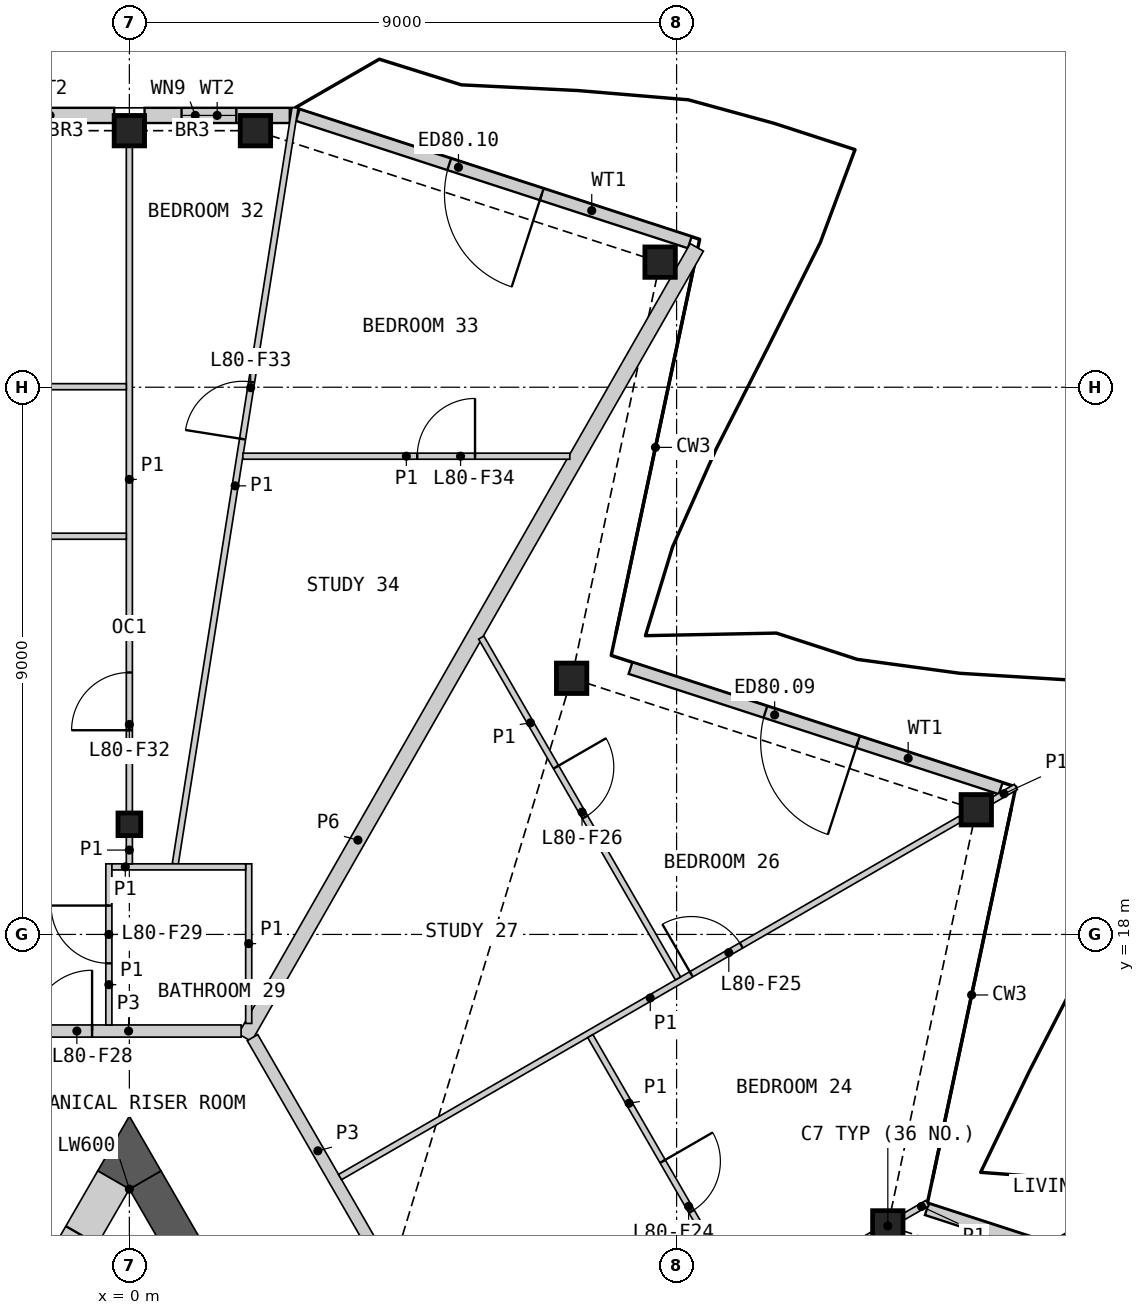
"""IFC4 building model, lengths in metres.
Left out: names, types, materials, properties, quantities, classifications, styles, units other than length and angle.
Written with IfcOpenShell. Run it as: python <this file> out.ifc"""

import sys

from ifc_helpers import new_model, si_unit, direction, frame, frame_2d, origin, origin_2d, place, context, subcontext, project, spatial, polyline, rectangle, hollow_rectangle, i_section, outline, extrude, element, fill, save


model = new_model("IFC4")
c1 = context("Model", 3, precision=1e-05, world=origin(), true_north=direction((0.0, 1.0)))
c2 = subcontext(c1, "Body", "Model", "MODEL_VIEW")
j1 = project(units=[si_unit("LENGTHUNIT", "METRE"), si_unit("PLANEANGLEUNIT", "RADIAN")], contexts=[c1])
p1 = place(None, origin())
s1 = spatial("IfcSite", under=j1, at=p1, CompositionType="ELEMENT")
p2 = place(p1, origin())
s2 = spatial("IfcBuilding", under=s1, at=p2, CompositionType="ELEMENT")
p3 = place(p2, frame((0.0, 0.0, 361.0)))
s3 = spatial("IfcBuildingStorey", under=s2, at=p3, CompositionType="ELEMENT", Elevation=361.0)
for number, where, z_axis, x_axis in (
    (1, (12.474, 13.206, 0.0), (0.0, 0.0, 1.0), (1.0, 0.0, 0.0)),
    (2, (13.929, 20.051, 0.0), (0.0, 0.0, 1.0), (1.0, 0.0, 0.0)),
    (3, (7.274, 22.213, 0.0), (0.0, 0.0, 1.0), (1.0, 0.0, 0.0)),
    (4, (8.729, 29.057, 0.0), (0.0, 0.0, 1.0), (1.0, 0.0, 0.0)),
    (5, (2.074, 31.219, 0.0), (0.0, 0.0, 1.0), (1.0, 0.0, 0.0)),
    (6, (0.0, 31.219, 0.0), (0.0, 0.0, 1.0), (1.0, 0.0, 0.0)),
):
    element("IfcColumn", number, at=place(p3, frame(where, z_axis=z_axis, x_axis=x_axis)), inside=s3, PredefinedType="COLUMN", context=c2, shape_type="SweptSolid", body=[
        extrude(hollow_rectangle(XDim=0.5, YDim=0.5, WallThickness=0.03, at=origin_2d()), origin(), (0.0, 0.0, 1.0), 3.4),
    ])
p4 = place(p3, frame((0.0, 19.811, 0.0), z_axis=(0.0, 0.0, 1.0), x_axis=(1.0, 0.0, 0.0)))
e7 = element("IfcColumn", 7, at=p4, inside=s3, PredefinedType="COLUMN", context=c2, shape_type="SweptSolid", body=[
    extrude(i_section(OverallWidth=0.374, OverallDepth=0.372, WebThickness=0.016, FlangeThickness=0.026, at=origin_2d()), origin(), (0.0, 0.0, 1.0), 3.4),
])
p5 = place(p3, frame((19.467, 11.416, 0.0), z_axis=(0.0, 0.0, 1.0), x_axis=(-0.951057706878, 0.309013330114, 0.0)))
e8 = element("IfcWall", 8, at=p5, inside=s3, PredefinedType="SOLIDWALL", context=c2, shape_type="SweptSolid", body=[
    extrude(rectangle(XDim=6.678, YDim=0.2, at=frame_2d((3.339, 0.0))), origin(), (0.0, 0.0, 1.0), 2.634),
])
p6 = place(p5, frame((2.402, 0.0, 0.0)))
e9 = element("IfcOpeningElement", 9, at=p6, cuts=e8, PredefinedType="OPENING", context=c2, shape_type="SweptSolid", body=[
    extrude(rectangle(XDim=1.6, YDim=2.25, at=frame_2d((0.8, 1.125))), frame((0.0, 0.11, 0.0), z_axis=(0.0, -1.0, 0.0), x_axis=(1.0, 0.0, 0.0)), (0.0, 0.0, 1.0), 0.22),
])
p7 = place(p3, frame((14.331, 20.402, 0.0), z_axis=(0.0, 0.0, 1.0), x_axis=(-0.951058447414, 0.30901105094, 0.0)))
e10 = element("IfcWall", 10, at=p7, inside=s3, PredefinedType="SOLIDWALL", context=c2, shape_type="SweptSolid", body=[
    extrude(rectangle(XDim=6.402, YDim=0.2, at=frame_2d((3.201, 0.0))), origin(), (0.0, 0.0, 1.0), 2.634),
])
p8 = place(p7, frame((2.469, 0.0, 0.0)))
e11 = element("IfcOpeningElement", 11, at=p8, cuts=e10, PredefinedType="OPENING", context=c2, shape_type="SweptSolid", body=[
    extrude(rectangle(XDim=1.6, YDim=2.25, at=frame_2d((0.8, 1.125))), frame((0.0, 0.11, 0.0), z_axis=(0.0, -1.0, 0.0), x_axis=(1.0, 0.0, 0.0)), (0.0, 0.0, 1.0), 0.22),
])
p9 = place(p3, frame((9.216, 29.381, 0.0), z_axis=(0.0, 0.0, 1.0), x_axis=(-0.951058150748, 0.309011964002, 0.0)))
e12 = element("IfcWall", 12, at=p9, inside=s3, PredefinedType="SOLIDWALL", context=c2, shape_type="SweptSolid", body=[
    extrude(rectangle(XDim=6.779, YDim=0.2, at=frame_2d((3.389, 0.0))), origin(), (0.0, 0.0, 1.0), 2.634),
])
p10 = place(p9, frame((2.559, 0.0, 0.0)))
e13 = element("IfcOpeningElement", 13, at=p10, cuts=e12, PredefinedType="OPENING", context=c2, shape_type="SweptSolid", body=[
    extrude(rectangle(XDim=1.6, YDim=2.25, at=frame_2d((0.8, 1.125))), frame((0.0, 0.11, 0.0), z_axis=(0.0, -1.0, 0.0), x_axis=(1.0, 0.0, 0.0)), (0.0, 0.0, 1.0), 0.22),
])
p11 = place(p3, frame((2.638, 31.47, 0.0), z_axis=(0.0, 0.0, 1.0), x_axis=(-1.0, 0.0, 0.0)))
e14 = element("IfcWall", 14, at=p11, inside=s3, PredefinedType="SOLIDWALL", context=c2, shape_type="SweptSolid", body=[
    extrude(rectangle(XDim=2.388, YDim=0.25, at=frame_2d((1.194, 0.0))), origin(), (0.0, 0.0, 1.0), 2.634),
])
p12 = place(p11, frame((0.88, 0.0, 0.6)))
e15 = element("IfcOpeningElement", 15, at=p12, cuts=e14, PredefinedType="OPENING", context=c2, shape_type="SweptSolid", body=[
    extrude(rectangle(XDim=0.9, YDim=1.8, at=frame_2d((0.45, 0.9))), frame((0.0, 0.135, 0.0), z_axis=(0.0, -1.0, 0.0), x_axis=(1.0, 0.0, 0.0)), (0.0, 0.0, 1.0), 0.27),
])
p13 = place(p3, frame((-0.25, 31.47, 0.0), z_axis=(0.0, 0.0, 1.0), x_axis=(-1.0, 0.0, 0.0)))
e16 = element("IfcWall", 16, at=p13, inside=s3, PredefinedType="SOLIDWALL", context=c2, shape_type="SweptSolid", body=[
    extrude(rectangle(XDim=2.109, YDim=0.25, at=frame_2d((1.054, 0.0))), origin(), (0.0, 0.0, 1.0), 2.634),
])
p14 = place(p3, frame((2.361, 10.322, 0.0), z_axis=(0.0, 0.0, 1.0), x_axis=(-0.500000735859, 0.866024978935, 0.0)))
e17 = element("IfcWall", 17, at=p14, inside=s3, PredefinedType="SHEAR", context=c2, shape_type="SweptSolid", body=[
    extrude(rectangle(XDim=4.202, YDim=0.6, at=frame_2d((2.101, 0.0))), origin(), (0.0, 0.0, 1.0), 3.1),
])
p15 = place(p3, origin())
e18 = element("IfcWall", 18, at=p15, inside=s3, PredefinedType="SHEAR", context=c2, shape_type="SweptSolid", body=[
    extrude(outline(polyline([(0.0, 13.811), (-0.52, 14.111), (0.0, 15.011), (0.52, 14.111), (0.0, 13.811)])), origin(), (0.0, 0.0, 1.0), 3.1),
])
p16 = place(p3, frame((-0.26, 13.961, 0.0), z_axis=(0.0, 0.0, 1.0), x_axis=(-0.49997936161, -0.866037319036, 0.0)))
e19 = element("IfcWall", 19, at=p16, inside=s3, PredefinedType="SHEAR", context=c2, shape_type="SweptSolid", body=[
    extrude(rectangle(XDim=2.66, YDim=0.6, at=frame_2d((1.33, 0.0))), origin(), (0.0, 0.0, 1.0), 3.1),
])
p17 = place(p16, frame((1.05, 0.0, 0.0)))
e20 = element("IfcOpeningElement", 20, at=p17, cuts=e19, PredefinedType="OPENING", context=c2, shape_type="SweptSolid", body=[
    extrude(rectangle(XDim=1.0, YDim=2.1, at=frame_2d((0.5, 1.05))), frame((0.0, 0.31, 0.0), z_axis=(0.0, -1.0, 0.0), x_axis=(1.0, 0.0, 0.0)), (0.0, 0.0, 1.0), 0.62),
])
p18 = place(p3, frame((1.901, 16.302, 0.0), z_axis=(0.0, 0.0, 1.0), x_axis=(0.496368960053, 0.86811166073, 0.0)))
e21 = element("IfcWall", 21, at=p18, inside=s3, PredefinedType="PARTITIONING", context=c2, shape_type="SweptSolid", body=[
    extrude(rectangle(XDim=14.972, YDim=0.25, at=frame_2d((7.486, 0.0))), origin(), (0.0, 0.0, 1.0), 2.33),
])
p19 = place(p3, frame((2.025, 16.303, 0.0), z_axis=(0.0, 0.0, 1.0), x_axis=(0.500004215162, -0.866022970146, 0.0)))
e22 = element("IfcWall", 22, at=p19, inside=s3, PredefinedType="PARTITIONING", context=c2, shape_type="SweptSolid", body=[
    extrude(rectangle(XDim=4.3, YDim=0.2, at=frame_2d((2.15, 0.0))), origin(), (0.0, 0.0, 1.0), 3.1),
])
p20 = place(p3, frame((-1.863, 16.411, 0.0), z_axis=(0.0, 0.0, 1.0), x_axis=(1.0, 0.0, 0.0)))
e23 = element("IfcWall", 23, at=p20, inside=s3, PredefinedType="PARTITIONING", context=c2, shape_type="SweptSolid", body=[
    extrude(rectangle(XDim=3.701, YDim=0.2, at=frame_2d((1.851, 0.0))), origin(), (0.0, 0.0, 1.0), 3.1),
])
p21 = place(p20, frame((0.25, 0.0, 0.0)))
e24 = element("IfcOpeningElement", 24, at=p21, cuts=e23, PredefinedType="OPENING", context=c2, shape_type="SweptSolid", body=[
    extrude(rectangle(XDim=1.0, YDim=2.1, at=frame_2d((0.5, 1.05))), frame((0.0, 0.11, 0.0), z_axis=(0.0, -1.0, 0.0), x_axis=(1.0, 0.0, 0.0)), (0.0, 0.0, 1.0), 0.22),
])
p22 = place(p3, frame((0.755, 19.16, 0.0), z_axis=(0.0, 0.0, 1.0), x_axis=(0.15643456532, 0.987688324712, 0.0)))
e25 = element("IfcWall", 25, at=p22, inside=s3, PredefinedType="PARTITIONING", context=c2, shape_type="SweptSolid", body=[
    extrude(rectangle(XDim=12.59, YDim=0.1, at=frame_2d((6.295, 0.0))), origin(), (0.0, 0.0, 1.0), 2.33),
])
p23 = place(p22, frame((7.074, 0.0, 0.0)))
e26 = element("IfcOpeningElement", 26, at=p23, cuts=e25, PredefinedType="OPENING", context=c2, shape_type="SweptSolid", body=[
    extrude(rectangle(XDim=0.95, YDim=2.1, at=frame_2d((0.475, 1.05))), frame((0.0, 0.06, 0.0), z_axis=(0.0, -1.0, 0.0), x_axis=(1.0, 0.0, 0.0)), (0.0, 0.0, 1.0), 0.12),
])
p24 = place(p3, frame((3.465, 14.01, 0.0), z_axis=(0.0, 0.0, 1.0), x_axis=(0.866032376801, 0.499987922186, 0.0)))
e27 = element("IfcWall", 27, at=p24, inside=s3, PredefinedType="PARTITIONING", context=c2, shape_type="SweptSolid", body=[
    extrude(rectangle(XDim=11.782, YDim=0.1, at=frame_2d((5.891, 0.0))), origin(), (0.0, 0.0, 1.0), 2.33),
])
p25 = place(p24, frame((6.67, 0.0, 0.0)))
e28 = element("IfcOpeningElement", 28, at=p25, cuts=e27, PredefinedType="OPENING", context=c2, shape_type="SweptSolid", body=[
    extrude(rectangle(XDim=0.95, YDim=2.1, at=frame_2d((0.475, 1.05))), frame((0.0, 0.06, 0.0), z_axis=(0.0, -1.0, 0.0), x_axis=(1.0, 0.0, 0.0)), (0.0, 0.0, 1.0), 0.12),
])
p26 = place(p3, frame((0.0, 20.008, 0.0), z_axis=(0.0, 0.0, 1.0), x_axis=(0.0, 1.0, 0.0)))
e29 = element("IfcWall", 29, at=p26, inside=s3, PredefinedType="PARTITIONING", context=c2, shape_type="SweptSolid", body=[
    extrude(rectangle(XDim=10.951, YDim=0.1, at=frame_2d((5.476, 0.0))), origin(), (0.0, 0.0, 1.0), 2.33),
])
p27 = place(p26, frame((1.35, 0.0, 0.0)))
e30 = element("IfcOpeningElement", 30, at=p27, cuts=e29, PredefinedType="OPENING", context=c2, shape_type="SweptSolid", body=[
    extrude(rectangle(XDim=0.95, YDim=2.1, at=frame_2d((0.475, 1.05))), frame((0.0, 0.06, 0.0), z_axis=(0.0, -1.0, 0.0), x_axis=(1.0, 0.0, 0.0)), (0.0, 0.0, 1.0), 0.12),
])
p28 = place(p3, frame((-7.922, 27.009, 0.0), z_axis=(0.0, 0.0, 1.0), x_axis=(1.0, 0.0, 0.0)))
e31 = element("IfcWall", 31, at=p28, inside=s3, PredefinedType="PARTITIONING", context=c2, shape_type="SweptSolid", body=[
    extrude(rectangle(XDim=7.872, YDim=0.1, at=frame_2d((3.936, 0.0))), origin(), (0.0, 0.0, 1.0), 2.33),
])
p29 = place(p28, frame((3.762, 0.0, 0.0)))
e32 = element("IfcOpeningElement", 32, at=p29, cuts=e31, PredefinedType="OPENING", context=c2, shape_type="SweptSolid", body=[
    extrude(rectangle(XDim=0.95, YDim=2.1, at=frame_2d((0.475, 1.05))), frame((0.0, 0.06, 0.0), z_axis=(0.0, -1.0, 0.0), x_axis=(1.0, 0.0, 0.0)), (0.0, 0.0, 1.0), 0.12),
])
p30 = place(p3, frame((6.065, 9.506, 0.0), z_axis=(0.0, 0.0, 1.0), x_axis=(0.866018949465, 0.500011179042, 0.0)))
e33 = element("IfcWall", 33, at=p30, inside=s3, PredefinedType="PARTITIONING", context=c2, shape_type="SweptSolid", body=[
    extrude(rectangle(XDim=7.1, YDim=0.1, at=frame_2d((3.55, 0.0))), origin(), (0.0, 0.0, 1.0), 2.33),
])
p31 = place(p30, frame((4.992, 0.0, 0.0)))
e34 = element("IfcOpeningElement", 34, at=p31, cuts=e33, PredefinedType="OPENING", context=c2, shape_type="SweptSolid", body=[
    extrude(rectangle(XDim=0.95, YDim=2.1, at=frame_2d((0.475, 1.05))), frame((0.0, 0.06, 0.0), z_axis=(0.0, -1.0, 0.0), x_axis=(1.0, 0.0, 0.0)), (0.0, 0.0, 1.0), 0.12),
])
p32 = place(p3, frame((5.787, 22.882, 0.0), z_axis=(0.0, 0.0, 1.0), x_axis=(0.500001069878, -0.866024786089, 0.0)))
e35 = element("IfcWall", 35, at=p32, inside=s3, PredefinedType="PARTITIONING", context=c2, shape_type="SweptSolid", body=[
    extrude(rectangle(XDim=6.473, YDim=0.1, at=frame_2d((3.236, 0.0))), origin(), (0.0, 0.0, 1.0), 2.33),
])
p33 = place(p32, frame((2.46, 0.0, 0.0)))
e36 = element("IfcOpeningElement", 36, at=p33, cuts=e35, PredefinedType="OPENING", context=c2, shape_type="SweptSolid", body=[
    extrude(rectangle(XDim=0.95, YDim=2.1, at=frame_2d((0.475, 1.05))), frame((0.0, 0.06, 0.0), z_axis=(0.0, -1.0, 0.0), x_axis=(1.0, 0.0, 0.0)), (0.0, 0.0, 1.0), 0.12),
])
p34 = place(p3, frame((-6.516, 24.549, 0.0), z_axis=(0.0, 0.0, 1.0), x_axis=(1.0, 0.0, 0.0)))
e37 = element("IfcWall", 37, at=p34, inside=s3, PredefinedType="PARTITIONING", context=c2, shape_type="SweptSolid", body=[
    extrude(rectangle(XDim=6.466, YDim=0.1, at=frame_2d((3.233, 0.0))), origin(), (0.0, 0.0, 1.0), 2.33),
])
p35 = place(p34, frame((3.46, 0.0, 0.0)))
e38 = element("IfcOpeningElement", 38, at=p35, cuts=e37, PredefinedType="OPENING", context=c2, shape_type="SweptSolid", body=[
    extrude(rectangle(XDim=0.95, YDim=2.1, at=frame_2d((0.475, 1.05))), frame((0.0, 0.06, 0.0), z_axis=(0.0, -1.0, 0.0), x_axis=(1.0, 0.0, 0.0)), (0.0, 0.0, 1.0), 0.12),
])
p36 = place(p3, frame((1.867, 25.865, 0.0), z_axis=(0.0, 0.0, 1.0), x_axis=(1.0, 0.0, 0.0)))
e39 = element("IfcWall", 39, at=p36, inside=s3, PredefinedType="PARTITIONING", context=c2, shape_type="SweptSolid", body=[
    extrude(rectangle(XDim=5.376, YDim=0.1, at=frame_2d((2.688, 0.0))), origin(), (0.0, 0.0, 1.0), 2.33),
])
p37 = place(p36, frame((2.868, 0.0, 0.0)))
e40 = element("IfcOpeningElement", 40, at=p37, cuts=e39, PredefinedType="OPENING", context=c2, shape_type="SweptSolid", body=[
    extrude(rectangle(XDim=0.95, YDim=2.1, at=frame_2d((0.475, 1.05))), frame((0.0, 0.06, 0.0), z_axis=(0.0, -1.0, 0.0), x_axis=(1.0, 0.0, 0.0)), (0.0, 0.0, 1.0), 0.12),
])
p38 = place(p3, frame((7.581, 16.328, 0.0), z_axis=(0.0, 0.0, 1.0), x_axis=(0.500005610874, -0.86602216432, 0.0)))
e41 = element("IfcWall", 41, at=p38, inside=s3, PredefinedType="PARTITIONING", context=c2, shape_type="SweptSolid", body=[
    extrude(rectangle(XDim=5.1, YDim=0.1, at=frame_2d((2.55, 0.0))), origin(), (0.0, 0.0, 1.0), 2.33),
])
p39 = place(p38, frame((2.379, 0.0, 0.0)))
e42 = element("IfcOpeningElement", 42, at=p39, cuts=e41, PredefinedType="OPENING", context=c2, shape_type="SweptSolid", body=[
    extrude(rectangle(XDim=0.95, YDim=2.1, at=frame_2d((0.475, 1.05))), frame((0.0, 0.06, 0.0), z_axis=(0.0, -1.0, 0.0), x_axis=(1.0, 0.0, 0.0)), (0.0, 0.0, 1.0), 0.12),
])
p40 = place(p3, frame((-0.337, 16.511, 0.0), z_axis=(0.0, 0.0, 1.0), x_axis=(0.0, 1.0, 0.0)))
e43 = element("IfcWall", 43, at=p40, inside=s3, PredefinedType="PARTITIONING", context=c2, shape_type="SweptSolid", body=[
    extrude(rectangle(XDim=2.65, YDim=0.1, at=frame_2d((1.325, 0.0))), origin(), (0.0, 0.0, 1.0), 2.33),
])
p41 = place(p40, frame((1.014, 0.0, 0.0)))
e44 = element("IfcOpeningElement", 44, at=p41, cuts=e43, PredefinedType="OPENING", context=c2, shape_type="SweptSolid", body=[
    extrude(rectangle(XDim=0.95, YDim=2.1, at=frame_2d((0.475, 1.05))), frame((0.0, 0.06, 0.0), z_axis=(0.0, -1.0, 0.0), x_axis=(1.0, 0.0, 0.0)), (0.0, 0.0, 1.0), 0.12),
])
p42 = place(p3, frame((1.963, 16.536, 0.0), z_axis=(0.0, 0.0, 1.0), x_axis=(0.0, 1.0, 0.0)))
e45 = element("IfcWall", 45, at=p42, inside=s3, PredefinedType="PARTITIONING", context=c2, shape_type="SweptSolid", body=[
    extrude(rectangle(XDim=2.625, YDim=0.1, at=frame_2d((1.312, 0.0))), origin(), (0.0, 0.0, 1.0), 2.33),
])
p43 = place(p3, frame((-0.287, 19.111, 0.0), z_axis=(0.0, 0.0, 1.0), x_axis=(1.0, 0.0, 0.0)))
e46 = element("IfcWall", 46, at=p43, inside=s3, PredefinedType="PARTITIONING", context=c2, shape_type="SweptSolid", body=[
    extrude(rectangle(XDim=2.2, YDim=0.1, at=frame_2d((1.1, 0.0))), origin(), (0.0, 0.0, 1.0), 2.33),
])
p44 = place(p3, frame((0.0, 19.161, 0.0), z_axis=(0.0, 0.0, 1.0), x_axis=(0.0, 1.0, 0.0)))
e47 = element("IfcWall", 47, at=p44, inside=s3, PredefinedType="PARTITIONING", context=c2, shape_type="SweptSolid", body=[
    extrude(rectangle(XDim=0.453, YDim=0.1, at=frame_2d((0.227, 0.0))), origin(), (0.0, 0.0, 1.0), 2.33),
])
for number, where, z_axis, x_axis in (
    (48, (14.189, 20.201, 0.0), (0.0, 0.0, 1.0), (0.866, 0.5, 0.0)),
    (49, (12.734, 13.356, 0.0), (0.0, 0.0, 1.0), (0.866, 0.5, 0.0)),
):
    element("IfcWall", number, at=place(p3, frame(where, z_axis=z_axis, x_axis=x_axis)), inside=s3, PredefinedType="PARTITIONING", context=c2, shape_type="SweptSolid", body=[
        extrude(rectangle(XDim=0.451, YDim=0.1, at=frame_2d((0.226, 0.0))), origin(), (0.0, 0.0, 1.0), 2.33),
    ])
p45 = place(p8, origin())
e50 = element("IfcDoor", 50, at=p45, inside=s3, OperationType="DOUBLE_DOOR_SINGLE_SWING", PredefinedType="DOOR", context=c2, shape_type="SweptSolid", body=[
    extrude(rectangle(XDim=1.6, YDim=2.25, at=frame_2d((0.8, 1.125))), frame((0.0, 0.025, 0.0), z_axis=(0.0, -1.0, 0.0), x_axis=(1.0, 0.0, 0.0)), (0.0, 0.0, 1.0), 0.05),
])
fill(e11, e50)
p46 = place(p10, origin())
e51 = element("IfcDoor", 51, at=p46, inside=s3, OperationType="DOUBLE_DOOR_SINGLE_SWING", PredefinedType="DOOR", context=c2, shape_type="SweptSolid", body=[
    extrude(rectangle(XDim=1.6, YDim=2.25, at=frame_2d((0.8, 1.125))), frame((0.0, 0.025, 0.0), z_axis=(0.0, -1.0, 0.0), x_axis=(1.0, 0.0, 0.0)), (0.0, 0.0, 1.0), 0.05),
])
fill(e13, e51)
p47 = place(p12, origin())
e52 = element("IfcWindow", 52, at=p47, inside=s3, PartitioningType="SINGLE_PANEL", PredefinedType="WINDOW", context=c2, shape_type="SweptSolid", body=[
    extrude(rectangle(XDim=0.9, YDim=1.8, at=frame_2d((0.45, 0.9))), frame((0.0, 0.03, 0.0), z_axis=(0.0, -1.0, 0.0), x_axis=(1.0, 0.0, 0.0)), (0.0, 0.0, 1.0), 0.06),
])
fill(e15, e52)
p48 = place(p39, origin())
e53 = element("IfcDoor", 53, at=p48, inside=s3, OperationType="SINGLE_SWING_LEFT", PredefinedType="DOOR", context=c2, shape_type="SweptSolid", body=[
    extrude(rectangle(XDim=0.95, YDim=2.1, at=frame_2d((0.475, 1.05))), frame((0.0, 0.025, 0.0), z_axis=(0.0, -1.0, 0.0), x_axis=(1.0, 0.0, 0.0)), (0.0, 0.0, 1.0), 0.05),
])
fill(e42, e53)
p49 = place(p25, origin())
e54 = element("IfcDoor", 54, at=p49, inside=s3, OperationType="SINGLE_SWING_LEFT", PredefinedType="DOOR", context=c2, shape_type="SweptSolid", body=[
    extrude(rectangle(XDim=0.95, YDim=2.1, at=frame_2d((0.475, 1.05))), frame((0.0, 0.025, 0.0), z_axis=(0.0, -1.0, 0.0), x_axis=(1.0, 0.0, 0.0)), (0.0, 0.0, 1.0), 0.05),
])
fill(e28, e54)
p50 = place(p33, origin())
e55 = element("IfcDoor", 55, at=p50, inside=s3, OperationType="SINGLE_SWING_LEFT", PredefinedType="DOOR", context=c2, shape_type="SweptSolid", body=[
    extrude(rectangle(XDim=0.95, YDim=2.1, at=frame_2d((0.475, 1.05))), frame((0.0, 0.025, 0.0), z_axis=(0.0, -1.0, 0.0), x_axis=(1.0, 0.0, 0.0)), (0.0, 0.0, 1.0), 0.05),
])
fill(e36, e55)
p51 = place(p21, origin())
e56 = element("IfcDoor", 56, at=p51, inside=s3, OperationType="SINGLE_SWING_RIGHT", PredefinedType="DOOR", context=c2, shape_type="SweptSolid", body=[
    extrude(rectangle(XDim=1.0, YDim=2.1, at=frame_2d((0.5, 1.05))), frame((0.0, 0.025, 0.0), z_axis=(0.0, -1.0, 0.0), x_axis=(1.0, 0.0, 0.0)), (0.0, 0.0, 1.0), 0.05),
])
fill(e24, e56)
p52 = place(p41, origin())
e57 = element("IfcDoor", 57, at=p52, inside=s3, OperationType="SINGLE_SWING_RIGHT", PredefinedType="DOOR", context=c2, shape_type="SweptSolid", body=[
    extrude(rectangle(XDim=0.95, YDim=2.1, at=frame_2d((0.475, 1.05))), frame((0.0, 0.025, 0.0), z_axis=(0.0, -1.0, 0.0), x_axis=(1.0, 0.0, 0.0)), (0.0, 0.0, 1.0), 0.05),
])
fill(e44, e57)
p53 = place(p27, origin())
e58 = element("IfcDoor", 58, at=p53, inside=s3, OperationType="SINGLE_SWING_LEFT", PredefinedType="DOOR", context=c2, shape_type="SweptSolid", body=[
    extrude(rectangle(XDim=0.95, YDim=2.1, at=frame_2d((0.475, 1.05))), frame((0.0, 0.025, 0.0), z_axis=(0.0, -1.0, 0.0), x_axis=(1.0, 0.0, 0.0)), (0.0, 0.0, 1.0), 0.05),
])
fill(e30, e58)
p54 = place(p23, origin())
e59 = element("IfcDoor", 59, at=p54, inside=s3, OperationType="SINGLE_SWING_LEFT", PredefinedType="DOOR", context=c2, shape_type="SweptSolid", body=[
    extrude(rectangle(XDim=0.95, YDim=2.1, at=frame_2d((0.475, 1.05))), frame((0.0, 0.025, 0.0), z_axis=(0.0, -1.0, 0.0), x_axis=(1.0, 0.0, 0.0)), (0.0, 0.0, 1.0), 0.05),
])
fill(e26, e59)
p55 = place(p37, origin())
e60 = element("IfcDoor", 60, at=p55, inside=s3, OperationType="SINGLE_SWING_RIGHT", PredefinedType="DOOR", context=c2, shape_type="SweptSolid", body=[
    extrude(rectangle(XDim=0.95, YDim=2.1, at=frame_2d((0.475, 1.05))), frame((0.0, 0.025, 0.0), z_axis=(0.0, -1.0, 0.0), x_axis=(1.0, 0.0, 0.0)), (0.0, 0.0, 1.0), 0.05),
])
fill(e40, e60)
save(model, sys.argv[1])
